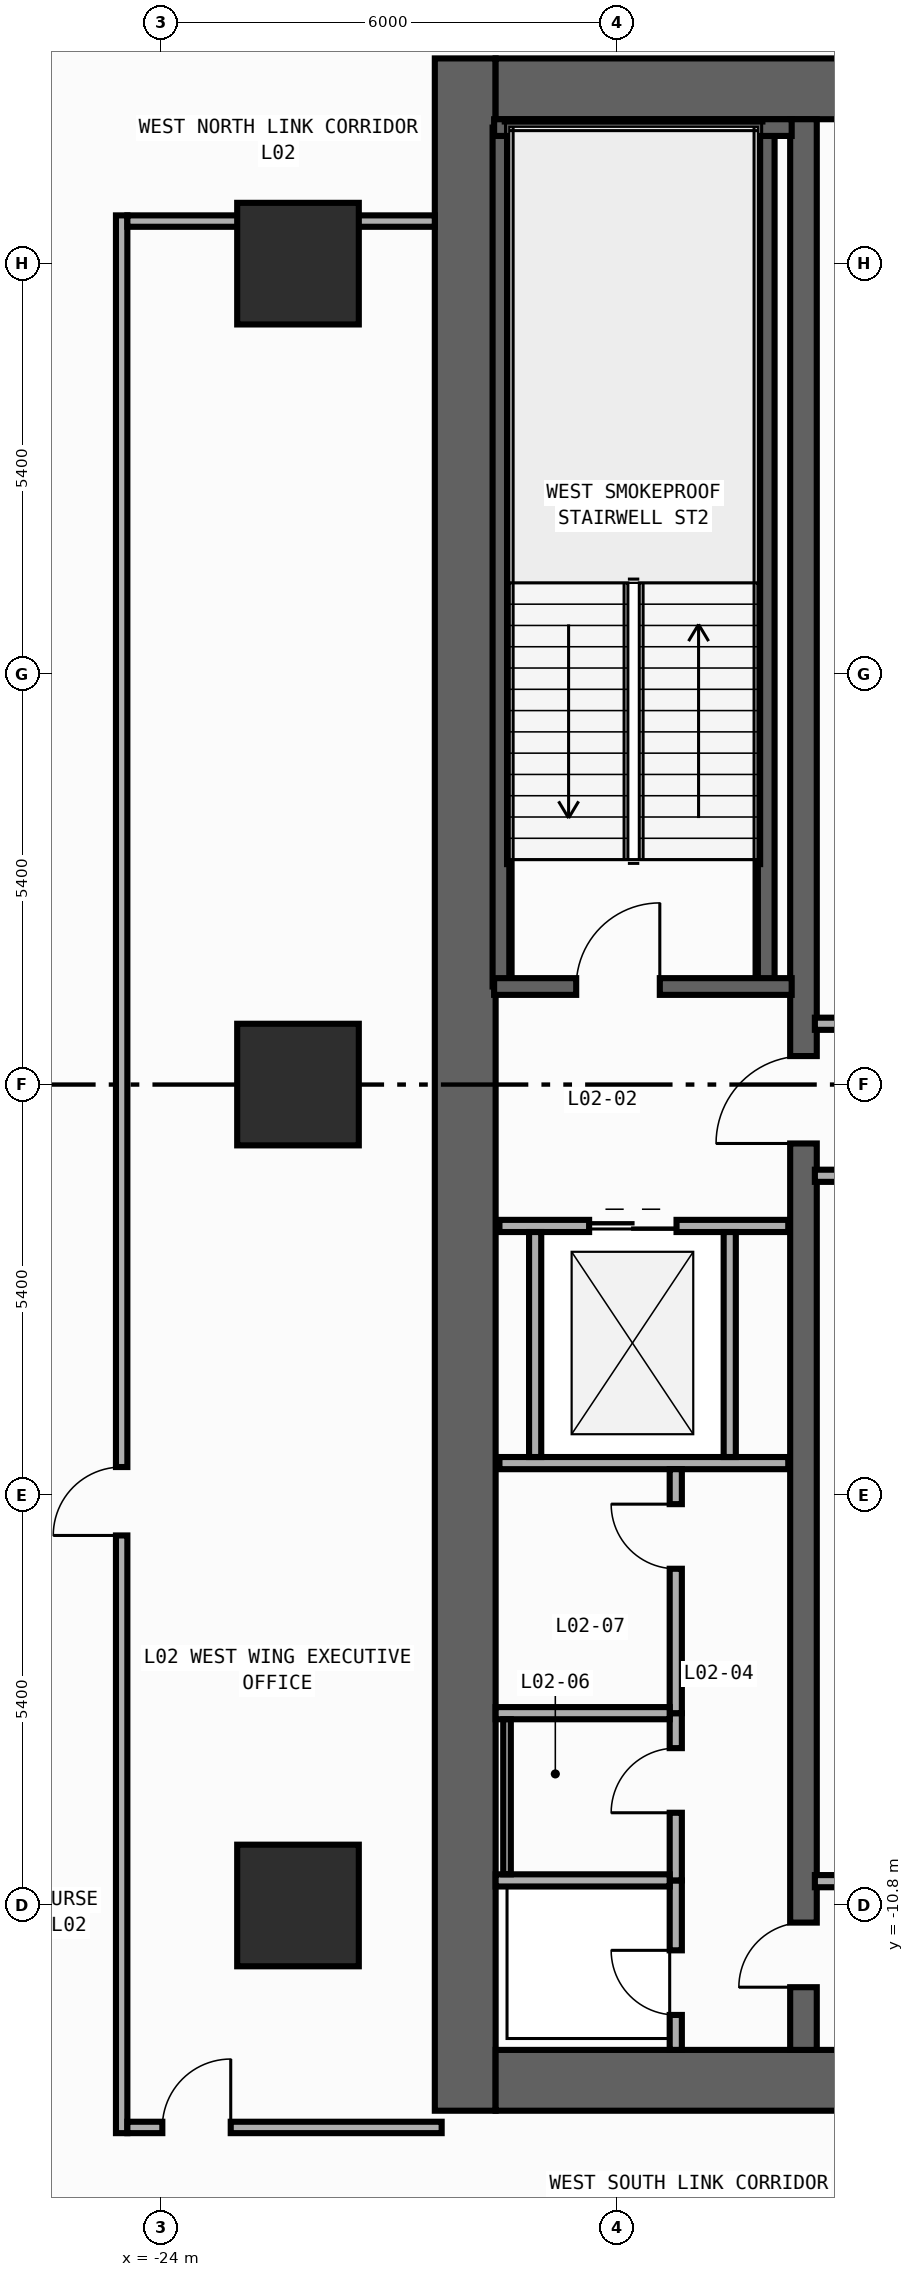
"""IFC4 building model, lengths in metres.
Left out: names, types, materials, properties, quantities, classifications, styles, units other than length and angle.
Written with IfcOpenShell. Run it as: python <this file> out.ifc"""

import sys

from ifc_helpers import new_model, si_unit, direction, frame, frame_2d, origin, origin_2d, place, context, subcontext, project, spatial, rectangle, extrude, element, fill, save


model = new_model("IFC4")
c1 = context("Model", 3, precision=1e-05, world=origin(), true_north=direction((0.0, 1.0)))
c2 = subcontext(c1, "Body", "Model", "MODEL_VIEW")
j1 = project(units=[si_unit("LENGTHUNIT", "METRE"), si_unit("PLANEANGLEUNIT", "RADIAN")], contexts=[c1])
p1 = place(None, origin())
s1 = spatial("IfcSite", under=j1, at=p1, CompositionType="ELEMENT")
p2 = place(p1, origin())
s2 = spatial("IfcBuilding", under=s1, at=p2, CompositionType="ELEMENT")
p3 = place(p2, frame((0.0, 0.0, 6.0)))
s3 = spatial("IfcBuildingStorey", under=s2, at=p3, CompositionType="ELEMENT", Elevation=6.0)
p4 = place(p3, frame((-20.0, -13.5, 0.0), z_axis=(0.0, 0.0, 1.0), x_axis=(0.0, 1.0, 0.0)))
e1 = element("IfcWall", 1, at=p4, inside=s3, PredefinedType="SHEAR", context=c2, shape_type="SweptSolid", body=[
    extrude(rectangle(XDim=27.0, YDim=0.8, at=frame_2d((13.5, 0.0))), origin(), (0.0, 0.0, 1.0), 4.7),
])
for number, where, z_axis, x_axis in (
    (2, (-19.6, -13.1, 0.0), (0.0, 0.0, 1.0), (1.0, 0.0, 0.0)),
    (3, (-19.6, 13.1, 0.0), (0.0, 0.0, 1.0), (1.0, 0.0, 0.0)),
):
    element("IfcWall", number, at=place(p3, frame(where, z_axis=z_axis, x_axis=x_axis)), inside=s3, PredefinedType="SHEAR", context=c2, shape_type="SweptSolid", body=[
        extrude(rectangle(XDim=6.8, YDim=0.8, at=frame_2d((3.4, 0.0))), origin(), (0.0, 0.0, 1.0), 4.7),
    ])
p5 = place(p3, frame((-15.55, -12.7, 0.0), z_axis=(0.0, 0.0, 1.0), x_axis=(0.0, 1.0, 0.0)))
e4 = element("IfcWall", 4, at=p5, inside=s3, PredefinedType="SHEAR", context=c2, shape_type="SweptSolid", body=[
    extrude(rectangle(XDim=25.4, YDim=0.35, at=frame_2d((12.7, 0.0))), origin(), (0.0, 0.0, 1.0), 4.7),
])
p6 = place(p5, frame((11.925, 0.0, 0.0)))
e5 = element("IfcOpeningElement", 5, at=p6, cuts=e4, PredefinedType="OPENING", context=c2, shape_type="SweptSolid", body=[
    extrude(rectangle(XDim=1.15, YDim=2.2, at=frame_2d((0.575, 1.1))), frame((0.0, 0.185, 0.0), z_axis=(0.0, -1.0, 0.0), x_axis=(1.0, 0.0, 0.0)), (0.0, 0.0, 1.0), 0.37),
])
p7 = place(p5, frame((0.825, 0.0, 0.0)))
e6 = element("IfcOpeningElement", 6, at=p7, cuts=e4, PredefinedType="OPENING", context=c2, shape_type="SweptSolid", body=[
    extrude(rectangle(XDim=0.85, YDim=2.1, at=frame_2d((0.425, 1.05))), frame((0.0, 0.185, 0.0), z_axis=(0.0, -1.0, 0.0), x_axis=(1.0, 0.0, 0.0)), (0.0, 0.0, 1.0), 0.37),
])
for number, where, z_axis, x_axis in (
    (7, (-16.04, 1.29, 0.0), (0.0, 0.0, 1.0), (0.0, 1.0, 0.0)),
    (8, (-19.53, 1.29, 0.0), (0.0, 0.0, 1.0), (0.0, 1.0, 0.0)),
):
    element("IfcWall", number, at=place(p3, frame(where, z_axis=z_axis, x_axis=x_axis)), inside=s3, PredefinedType="SHEAR", context=c2, shape_type="SweptSolid", body=[
        extrude(rectangle(XDim=11.3, YDim=0.22, at=frame_2d((5.65, 0.0))), origin(), (0.0, 0.0, 1.0), 4.7),
    ])
p8 = place(p3, frame((-19.62, 12.59, 0.0), z_axis=(0.0, 0.0, 1.0), x_axis=(1.0, 0.0, 0.0)))
e9 = element("IfcWall", 9, at=p8, inside=s3, PredefinedType="SHEAR", context=c2, shape_type="SweptSolid", body=[
    extrude(rectangle(XDim=3.915, YDim=0.22, at=frame_2d((1.958, 0.0))), origin(), (0.0, 0.0, 1.0), 4.7),
])
p9 = place(p3, frame((-19.62, 1.29, 0.0), z_axis=(0.0, 0.0, 1.0), x_axis=(1.0, 0.0, 0.0)))
e10 = element("IfcWall", 10, at=p9, inside=s3, PredefinedType="SHEAR", context=c2, shape_type="SweptSolid", body=[
    extrude(rectangle(XDim=3.915, YDim=0.22, at=frame_2d((1.958, 0.0))), origin(), (0.0, 0.0, 1.0), 4.7),
])
p10 = place(p9, frame((1.08, 0.0, 0.0)))
e11 = element("IfcOpeningElement", 11, at=p10, cuts=e10, PredefinedType="OPENING", context=c2, shape_type="SweptSolid", body=[
    extrude(rectangle(XDim=1.1, YDim=2.2, at=frame_2d((0.55, 1.1))), frame((0.0, 0.12, 0.0), z_axis=(0.0, -1.0, 0.0), x_axis=(1.0, 0.0, 0.0)), (0.0, 0.0, 1.0), 0.24),
])
for number, where, z_axis, x_axis in (
    (12, (-22.2, -10.8, 0.0), (0.0, 0.0, 1.0), (1.0, 0.0, 0.0)),
    (13, (-22.2, 0.0, 0.0), (0.0, 0.0, 1.0), (1.0, 0.0, 0.0)),
    (14, (-22.2, 10.8, 0.0), (0.0, 0.0, 1.0), (1.0, 0.0, 0.0)),
):
    element("IfcColumn", number, at=place(p3, frame(where, z_axis=z_axis, x_axis=x_axis)), inside=s3, PredefinedType="COLUMN", context=c2, shape_type="SweptSolid", body=[
        extrude(rectangle(XDim=1.6, YDim=1.6, at=origin_2d()), origin(), (0.0, 0.0, 1.0), 5.0),
    ])
p11 = place(p3, frame((-19.55, -1.86, 0.0), z_axis=(0.0, 0.0, 1.0), x_axis=(1.0, 0.0, 0.0)))
e15 = element("IfcWall", 15, at=p11, inside=s3, PredefinedType="STANDARD", context=c2, shape_type="SweptSolid", body=[
    extrude(rectangle(XDim=3.8, YDim=0.16, at=frame_2d((1.9, 0.0))), origin(), (0.0, 0.0, 1.0), 4.7),
])
p12 = place(p11, frame((1.18, 0.0, 0.0)))
e16 = element("IfcOpeningElement", 16, at=p12, cuts=e15, PredefinedType="OPENING", context=c2, shape_type="SweptSolid", body=[
    extrude(rectangle(XDim=1.15, YDim=2.2, at=frame_2d((0.575, 1.1))), frame((0.0, 0.09, 0.0), z_axis=(0.0, -1.0, 0.0), x_axis=(1.0, 0.0, 0.0)), (0.0, 0.0, 1.0), 0.18),
])
p13 = place(p3, frame((-19.55, -4.98, 0.0), z_axis=(0.0, 0.0, 1.0), x_axis=(1.0, 0.0, 0.0)))
e17 = element("IfcWall", 17, at=p13, inside=s3, PredefinedType="STANDARD", context=c2, shape_type="SweptSolid", body=[
    extrude(rectangle(XDim=3.8, YDim=0.16, at=frame_2d((1.9, 0.0))), origin(), (0.0, 0.0, 1.0), 4.7),
])
for number, where, z_axis, x_axis in (
    (18, (-19.08, -4.9, 0.0), (0.0, 0.0, 1.0), (0.0, 1.0, 0.0)),
    (19, (-16.52, -4.9, 0.0), (0.0, 0.0, 1.0), (0.0, 1.0, 0.0)),
):
    element("IfcWall", number, at=place(p3, frame(where, z_axis=z_axis, x_axis=x_axis)), inside=s3, PredefinedType="STANDARD", context=c2, shape_type="SweptSolid", body=[
        extrude(rectangle(XDim=2.96, YDim=0.16, at=frame_2d((1.48, 0.0))), origin(), (0.0, 0.0, 1.0), 4.7),
    ])
for number, where, z_axis, x_axis in (
    (20, (-15.4, 0.8, 0.0), (0.0, 0.0, 1.0), (1.0, 0.0, 0.0)),
    (21, (-15.4, -1.2, 0.0), (0.0, 0.0, 1.0), (1.0, 0.0, 0.0)),
    (22, (-15.4, -10.48, 0.0), (0.0, 0.0, 1.0), (1.0, 0.0, 0.0)),
):
    element("IfcWall", number, at=place(p3, frame(where, z_axis=z_axis, x_axis=x_axis)), inside=s3, PredefinedType="STANDARD", context=c2, shape_type="SweptSolid", body=[
        extrude(rectangle(XDim=2.6, YDim=0.16, at=frame_2d((1.3, 0.0))), origin(), (0.0, 0.0, 1.0), 4.7),
    ])
p14 = place(p3, frame((-17.23, -12.7, 0.0), z_axis=(0.0, 0.0, 1.0), x_axis=(0.0, 1.0, 0.0)))
e23 = element("IfcWall", 23, at=p14, inside=s3, PredefinedType="PARTITIONING", context=c2, shape_type="SweptSolid", body=[
    extrude(rectangle(XDim=2.23, YDim=0.16, at=frame_2d((1.115, 0.0))), origin(), (0.0, 0.0, 1.0), 4.7),
])
p15 = place(p14, frame((0.46, 0.0, 0.0)))
e24 = element("IfcOpeningElement", 24, at=p15, cuts=e23, PredefinedType="OPENING", context=c2, shape_type="SweptSolid", body=[
    extrude(rectangle(XDim=0.85, YDim=2.1, at=frame_2d((0.425, 1.05))), frame((0.0, 0.09, 0.0), z_axis=(0.0, -1.0, 0.0), x_axis=(1.0, 0.0, 0.0)), (0.0, 0.0, 1.0), 0.18),
])
p16 = place(p3, frame((-17.23, -10.47, 0.0), z_axis=(0.0, 0.0, 1.0), x_axis=(0.0, 1.0, 0.0)))
e25 = element("IfcWall", 25, at=p16, inside=s3, PredefinedType="PARTITIONING", context=c2, shape_type="SweptSolid", body=[
    extrude(rectangle(XDim=2.2, YDim=0.16, at=frame_2d((1.1, 0.0))), origin(), (0.0, 0.0, 1.0), 4.7),
])
p17 = place(p16, frame((0.89, 0.0, 0.0)))
e26 = element("IfcOpeningElement", 26, at=p17, cuts=e25, PredefinedType="OPENING", context=c2, shape_type="SweptSolid", body=[
    extrude(rectangle(XDim=0.85, YDim=2.1, at=frame_2d((0.425, 1.05))), frame((0.0, 0.09, 0.0), z_axis=(0.0, -1.0, 0.0), x_axis=(1.0, 0.0, 0.0)), (0.0, 0.0, 1.0), 0.18),
])
p18 = place(p3, frame((-17.23, -8.27, 0.0), z_axis=(0.0, 0.0, 1.0), x_axis=(0.0, 1.0, 0.0)))
e27 = element("IfcWall", 27, at=p18, inside=s3, PredefinedType="PARTITIONING", context=c2, shape_type="SweptSolid", body=[
    extrude(rectangle(XDim=3.21, YDim=0.16, at=frame_2d((1.605, 0.0))), origin(), (0.0, 0.0, 1.0), 4.7),
])
p19 = place(p18, frame((1.9, 0.0, 0.0)))
e28 = element("IfcOpeningElement", 28, at=p19, cuts=e27, PredefinedType="OPENING", context=c2, shape_type="SweptSolid", body=[
    extrude(rectangle(XDim=0.85, YDim=2.1, at=frame_2d((0.425, 1.05))), frame((0.0, 0.09, 0.0), z_axis=(0.0, -1.0, 0.0), x_axis=(1.0, 0.0, 0.0)), (0.0, 0.0, 1.0), 0.18),
])
for number, where, z_axis, x_axis in (
    (29, (-19.6, -10.47, 0.0), (0.0, 0.0, 1.0), (1.0, 0.0, 0.0)),
    (30, (-19.6, -8.27, 0.0), (0.0, 0.0, 1.0), (1.0, 0.0, 0.0)),
):
    element("IfcWall", number, at=place(p3, frame(where, z_axis=z_axis, x_axis=x_axis)), inside=s3, PredefinedType="PARTITIONING", context=c2, shape_type="SweptSolid", body=[
        extrude(rectangle(XDim=2.29, YDim=0.16, at=frame_2d((1.145, 0.0))), origin(), (0.0, 0.0, 1.0), 4.7),
    ])
p20 = place(p3, frame((-24.52, -13.795, 0.0), z_axis=(0.0, 0.0, 1.0), x_axis=(0.0, 1.0, 0.0)))
e31 = element("IfcWall", 31, at=p20, inside=s3, PredefinedType="PARTITIONING", context=c2, shape_type="SweptSolid", body=[
    extrude(rectangle(XDim=25.23, YDim=0.15, at=frame_2d((12.615, 0.0))), origin(), (0.0, 0.0, 1.0), 4.7),
])
p21 = place(p20, frame((7.863, 0.0, 0.0)))
e32 = element("IfcOpeningElement", 32, at=p21, cuts=e31, PredefinedType="OPENING", context=c2, shape_type="SweptSolid", body=[
    extrude(rectangle(XDim=0.9, YDim=2.15, at=frame_2d((0.45, 1.075))), frame((0.0, 0.085, 0.0), z_axis=(0.0, -1.0, 0.0), x_axis=(1.0, 0.0, 0.0)), (0.0, 0.0, 1.0), 0.17),
])
p22 = place(p3, frame((-24.445, -13.72, 0.0), z_axis=(0.0, 0.0, 1.0), x_axis=(1.0, 0.0, 0.0)))
e33 = element("IfcWall", 33, at=p22, inside=s3, PredefinedType="PARTITIONING", context=c2, shape_type="SweptSolid", body=[
    extrude(rectangle(XDim=4.135, YDim=0.15, at=frame_2d((2.067, 0.0))), origin(), (0.0, 0.0, 1.0), 4.7),
])
p23 = place(p22, frame((0.46, 0.0, 0.0)))
e34 = element("IfcOpeningElement", 34, at=p23, cuts=e33, PredefinedType="OPENING", context=c2, shape_type="SweptSolid", body=[
    extrude(rectangle(XDim=0.9, YDim=2.15, at=frame_2d((0.45, 1.075))), frame((0.0, 0.085, 0.0), z_axis=(0.0, -1.0, 0.0), x_axis=(1.0, 0.0, 0.0)), (0.0, 0.0, 1.0), 0.17),
])
p24 = place(p3, frame((-24.445, 11.36, 0.0), z_axis=(0.0, 0.0, 1.0), x_axis=(1.0, 0.0, 0.0)))
e35 = element("IfcWall", 35, at=p24, inside=s3, PredefinedType="PARTITIONING", context=c2, shape_type="SweptSolid", body=[
    extrude(rectangle(XDim=4.045, YDim=0.15, at=frame_2d((2.022, 0.0))), origin(), (0.0, 0.0, 1.0), 4.7),
])
p25 = place(p3, frame((-19.45, -10.39, 0.0), z_axis=(0.0, 0.0, 1.0), x_axis=(0.0, 1.0, 0.0)))
e36 = element("IfcWall", 36, at=p25, inside=s3, PredefinedType="PARTITIONING", context=c2, shape_type="SweptSolid", body=[
    extrude(rectangle(XDim=2.04, YDim=0.1, at=frame_2d((1.02, 0.0))), origin(), (0.0, 0.0, 1.0), 4.7),
])
p26 = place(p10, origin())
e37 = element("IfcDoor", 37, at=p26, inside=s3, OperationType="SINGLE_SWING_RIGHT", PredefinedType="DOOR", context=c2, shape_type="SweptSolid", body=[
    extrude(rectangle(XDim=1.1, YDim=2.2, at=frame_2d((0.55, 1.1))), frame((0.0, 0.025, 0.0), z_axis=(0.0, -1.0, 0.0), x_axis=(1.0, 0.0, 0.0)), (0.0, 0.0, 1.0), 0.05),
])
fill(e11, e37)
p27 = place(p6, origin())
e38 = element("IfcDoor", 38, at=p27, inside=s3, OperationType="SINGLE_SWING_LEFT", PredefinedType="DOOR", context=c2, shape_type="SweptSolid", body=[
    extrude(rectangle(XDim=1.15, YDim=2.2, at=frame_2d((0.575, 1.1))), frame((0.0, 0.025, 0.0), z_axis=(0.0, -1.0, 0.0), x_axis=(1.0, 0.0, 0.0)), (0.0, 0.0, 1.0), 0.05),
])
fill(e5, e38)
p28 = place(p7, origin())
e39 = element("IfcDoor", 39, at=p28, inside=s3, OperationType="SINGLE_SWING_LEFT", PredefinedType="DOOR", context=c2, shape_type="SweptSolid", body=[
    extrude(rectangle(XDim=0.85, YDim=2.1, at=frame_2d((0.425, 1.05))), frame((0.0, 0.025, 0.0), z_axis=(0.0, -1.0, 0.0), x_axis=(1.0, 0.0, 0.0)), (0.0, 0.0, 1.0), 0.05),
])
fill(e6, e39)
p29 = place(p12, origin())
e40 = element("IfcDoor", 40, at=p29, inside=s3, OperationType="DOUBLE_DOOR_SLIDING", PredefinedType="DOOR", context=c2, shape_type="SweptSolid", body=[
    extrude(rectangle(XDim=1.15, YDim=2.2, at=frame_2d((0.575, 1.1))), frame((0.0, 0.025, 0.0), z_axis=(0.0, -1.0, 0.0), x_axis=(1.0, 0.0, 0.0)), (0.0, 0.0, 1.0), 0.05),
])
fill(e16, e40)
p30 = place(p15, origin())
e41 = element("IfcDoor", 41, at=p30, inside=s3, OperationType="SINGLE_SWING_RIGHT", PredefinedType="DOOR", context=c2, shape_type="SweptSolid", body=[
    extrude(rectangle(XDim=0.85, YDim=2.1, at=frame_2d((0.425, 1.05))), frame((0.0, 0.025, 0.0), z_axis=(0.0, -1.0, 0.0), x_axis=(1.0, 0.0, 0.0)), (0.0, 0.0, 1.0), 0.05),
])
fill(e24, e41)
p31 = place(p17, origin())
e42 = element("IfcDoor", 42, at=p31, inside=s3, OperationType="SINGLE_SWING_LEFT", PredefinedType="DOOR", context=c2, shape_type="SweptSolid", body=[
    extrude(rectangle(XDim=0.85, YDim=2.1, at=frame_2d((0.425, 1.05))), frame((0.0, 0.025, 0.0), z_axis=(0.0, -1.0, 0.0), x_axis=(1.0, 0.0, 0.0)), (0.0, 0.0, 1.0), 0.05),
])
fill(e26, e42)
p32 = place(p19, origin())
e43 = element("IfcDoor", 43, at=p32, inside=s3, OperationType="SINGLE_SWING_RIGHT", PredefinedType="DOOR", context=c2, shape_type="SweptSolid", body=[
    extrude(rectangle(XDim=0.85, YDim=2.1, at=frame_2d((0.425, 1.05))), frame((0.0, 0.025, 0.0), z_axis=(0.0, -1.0, 0.0), x_axis=(1.0, 0.0, 0.0)), (0.0, 0.0, 1.0), 0.05),
])
fill(e28, e43)
p33 = place(p21, origin())
e44 = element("IfcDoor", 44, at=p33, inside=s3, OperationType="SINGLE_SWING_LEFT", PredefinedType="DOOR", context=c2, shape_type="SweptSolid", body=[
    extrude(rectangle(XDim=0.9, YDim=2.15, at=frame_2d((0.45, 1.075))), frame((0.0, 0.025, 0.0), z_axis=(0.0, -1.0, 0.0), x_axis=(1.0, 0.0, 0.0)), (0.0, 0.0, 1.0), 0.05),
])
fill(e32, e44)
p34 = place(p23, origin())
e45 = element("IfcDoor", 45, at=p34, inside=s3, OperationType="SINGLE_SWING_RIGHT", PredefinedType="DOOR", context=c2, shape_type="SweptSolid", body=[
    extrude(rectangle(XDim=0.9, YDim=2.15, at=frame_2d((0.45, 1.075))), frame((0.0, 0.025, 0.0), z_axis=(0.0, -1.0, 0.0), x_axis=(1.0, 0.0, 0.0)), (0.0, 0.0, 1.0), 0.05),
])
fill(e34, e45)
save(model, sys.argv[1])
